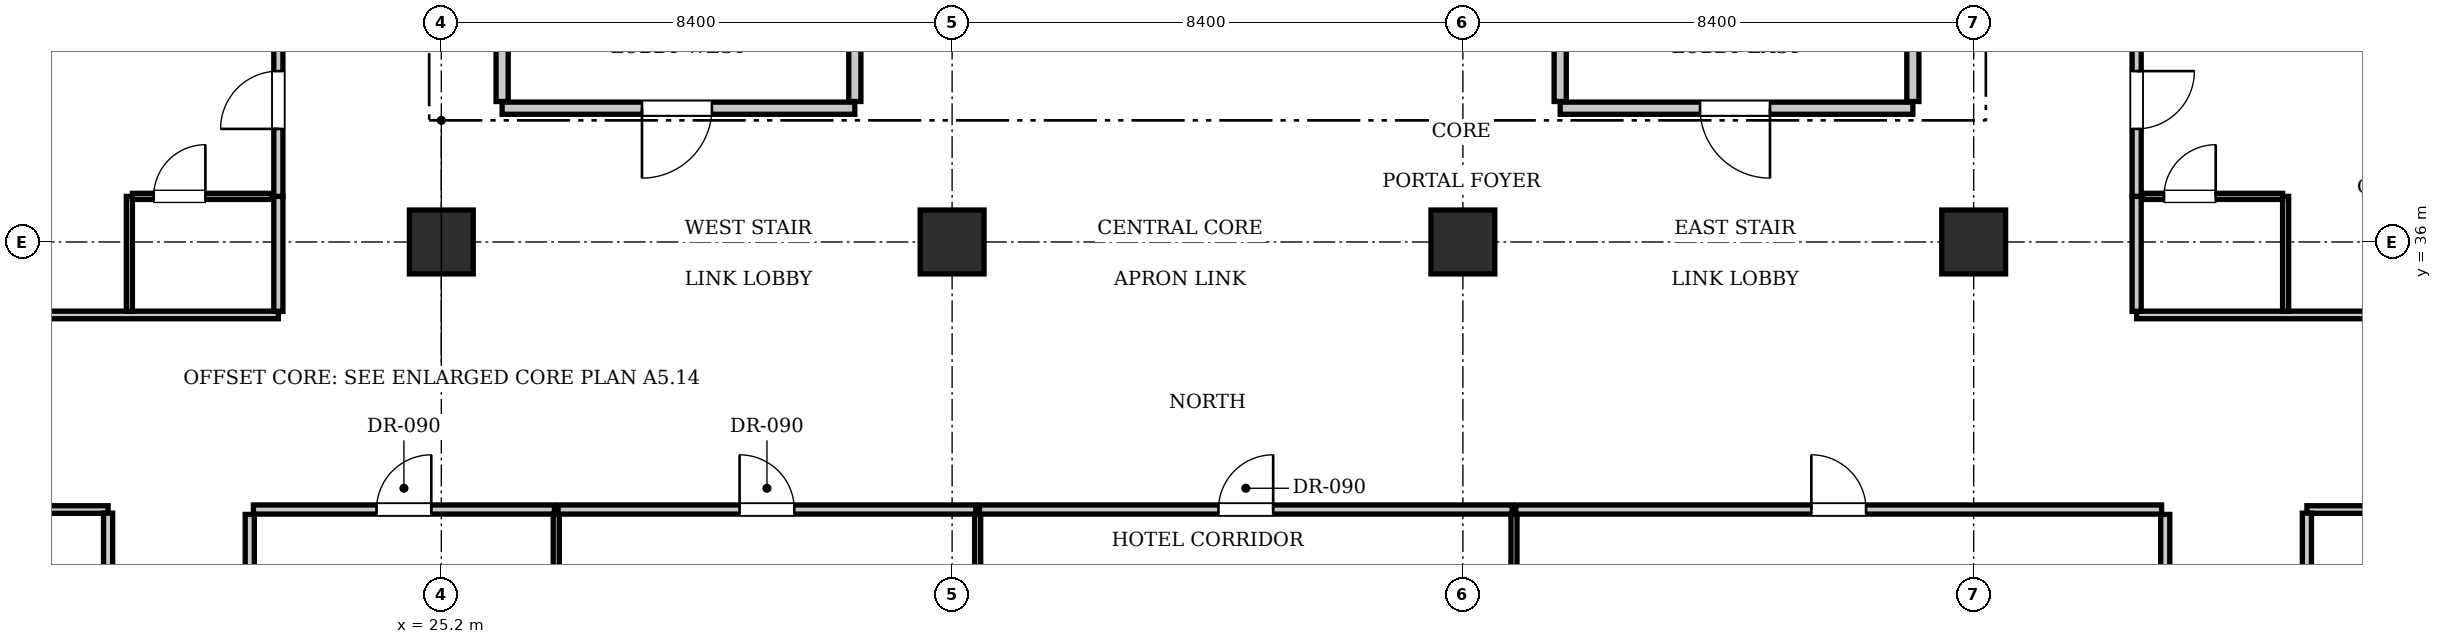
"""IFC4 building model, lengths in metres.
Left out: names, types, materials, properties, quantities, classifications, styles, units other than length and angle.
Written with IfcOpenShell. Run it as: python <this file> out.ifc"""

import sys

from ifc_helpers import new_model, si_unit, direction, frame, frame_2d, origin, origin_2d, place, context, subcontext, project, spatial, rectangle, extrude, element, fill, save


model = new_model("IFC4")
c1 = context("Model", 3, precision=1e-05, world=origin(), true_north=direction((0.0, 1.0)))
c2 = subcontext(c1, "Body", "Model", "MODEL_VIEW")
j1 = project(units=[si_unit("LENGTHUNIT", "METRE"), si_unit("PLANEANGLEUNIT", "RADIAN")], contexts=[c1])
p1 = place(None, origin())
s1 = spatial("IfcSite", under=j1, at=p1, CompositionType="ELEMENT")
p2 = place(p1, origin())
s2 = spatial("IfcBuilding", under=s1, at=p2, CompositionType="ELEMENT")
p3 = place(p2, frame((0.0, 0.0, 80.85)))
s3 = spatial("IfcBuildingStorey", under=s2, at=p3, CompositionType="ELEMENT", Elevation=80.85)
for number, where, z_axis, x_axis in (
    (1, (25.2, 36.0, 0.0), (0.0, 0.0, 1.0), (1.0, 0.0, 0.0)),
    (2, (33.6, 36.0, 0.0), (0.0, 0.0, 1.0), (1.0, 0.0, 0.0)),
    (3, (42.0, 36.0, 0.0), (0.0, 0.0, 1.0), (1.0, 0.0, 0.0)),
    (4, (50.4, 36.0, 0.0), (0.0, 0.0, 1.0), (1.0, 0.0, 0.0)),
):
    element("IfcColumn", number, at=place(p3, frame(where, z_axis=z_axis, x_axis=x_axis)), inside=s3, PredefinedType="COLUMN", context=c2, shape_type="SweptSolid", body=[
        extrude(rectangle(XDim=1.05, YDim=1.05, at=origin_2d()), origin(), (0.0, 0.0, 1.0), 3.85),
    ])
p4 = place(p3, frame((26.2, 38.2, 0.0), z_axis=(0.0, 0.0, 1.0), x_axis=(1.0, 0.0, 0.0)))
e5 = element("IfcWall", 5, at=p4, inside=s3, PredefinedType="PARTITIONING", context=c2, shape_type="SweptSolid", body=[
    extrude(rectangle(XDim=5.8, YDim=0.2, at=frame_2d((2.9, 0.0))), origin(), (0.0, 0.0, 1.0), 3.61),
])
p5 = place(p4, frame((2.3, 0.0, 0.0)))
e6 = element("IfcOpeningElement", 6, at=p5, cuts=e5, PredefinedType="OPENING", context=c2, shape_type="SweptSolid", body=[
    extrude(rectangle(XDim=1.15, YDim=2.15, at=frame_2d((0.575, 1.075))), frame((0.0, 0.11, 0.0), z_axis=(0.0, -1.0, 0.0), x_axis=(1.0, 0.0, 0.0)), (0.0, 0.0, 1.0), 0.22),
])
for number, where, z_axis, x_axis in (
    (7, (26.2, 38.31, 0.0), (0.0, 0.0, 1.0), (0.0, 1.0, 0.0)),
    (8, (32.0, 38.31, 0.0), (0.0, 0.0, 1.0), (0.0, 1.0, 0.0)),
):
    element("IfcWall", number, at=place(p3, frame(where, z_axis=z_axis, x_axis=x_axis)), inside=s3, PredefinedType="PARTITIONING", context=c2, shape_type="SweptSolid", body=[
        extrude(rectangle(XDim=3.07, YDim=0.2, at=frame_2d((1.535, 0.0))), origin(), (0.0, 0.0, 1.0), 3.61),
    ])
p6 = place(p3, frame((43.6, 38.2, 0.0), z_axis=(0.0, 0.0, 1.0), x_axis=(1.0, 0.0, 0.0)))
e9 = element("IfcWall", 9, at=p6, inside=s3, PredefinedType="PARTITIONING", context=c2, shape_type="SweptSolid", body=[
    extrude(rectangle(XDim=5.8, YDim=0.2, at=frame_2d((2.9, 0.0))), origin(), (0.0, 0.0, 1.0), 3.61),
])
p7 = place(p6, frame((2.3, 0.0, 0.0)))
e10 = element("IfcOpeningElement", 10, at=p7, cuts=e9, PredefinedType="OPENING", context=c2, shape_type="SweptSolid", body=[
    extrude(rectangle(XDim=1.15, YDim=2.15, at=frame_2d((0.575, 1.075))), frame((0.0, 0.11, 0.0), z_axis=(0.0, -1.0, 0.0), x_axis=(1.0, 0.0, 0.0)), (0.0, 0.0, 1.0), 0.22),
])
for number, where, z_axis, x_axis in (
    (11, (43.6, 38.31, 0.0), (0.0, 0.0, 1.0), (0.0, 1.0, 0.0)),
    (12, (49.4, 38.31, 0.0), (0.0, 0.0, 1.0), (0.0, 1.0, 0.0)),
):
    element("IfcWall", number, at=place(p3, frame(where, z_axis=z_axis, x_axis=x_axis)), inside=s3, PredefinedType="PARTITIONING", context=c2, shape_type="SweptSolid", body=[
        extrude(rectangle(XDim=3.07, YDim=0.2, at=frame_2d((1.535, 0.0))), origin(), (0.0, 0.0, 1.0), 3.61),
    ])
for number, where, z_axis, x_axis in (
    (13, (22.05, 23.68, 0.0), (0.0, 0.0, 1.0), (0.0, 1.0, 0.0)),
    (14, (53.55, 23.68, 0.0), (0.0, 0.0, 1.0), (0.0, 1.0, 0.0)),
):
    element("IfcWall", number, at=place(p3, frame(where, z_axis=z_axis, x_axis=x_axis)), inside=s3, PredefinedType="PARTITIONING", context=c2, shape_type="SweptSolid", body=[
        extrude(rectangle(XDim=7.84, YDim=0.15, at=frame_2d((3.92, 0.0))), origin(), (0.0, 0.0, 1.0), 3.61),
    ])
p8 = place(p3, frame((22.11, 31.6, 0.0), z_axis=(0.0, 0.0, 1.0), x_axis=(1.0, 0.0, 0.0)))
e15 = element("IfcWall", 15, at=p8, inside=s3, PredefinedType="PARTITIONING", context=c2, shape_type="SweptSolid", body=[
    extrude(rectangle(XDim=4.95, YDim=0.15, at=frame_2d((2.475, 0.0))), origin(), (0.0, 0.0, 1.0), 3.61),
])
p9 = place(p8, frame((2.025, 0.0, 0.0)))
e16 = element("IfcOpeningElement", 16, at=p9, cuts=e15, PredefinedType="OPENING", context=c2, shape_type="SweptSolid", body=[
    extrude(rectangle(XDim=0.9, YDim=2.1, at=frame_2d((0.45, 1.05))), frame((0.0, 0.085, 0.0), z_axis=(0.0, -1.0, 0.0), x_axis=(1.0, 0.0, 0.0)), (0.0, 0.0, 1.0), 0.17),
])
p10 = place(p3, frame((27.09, 23.68, 0.0), z_axis=(0.0, 0.0, 1.0), x_axis=(0.0, 1.0, 0.0)))
e17 = element("IfcWall", 17, at=p10, inside=s3, PredefinedType="PARTITIONING", context=c2, shape_type="SweptSolid", body=[
    extrude(rectangle(XDim=7.84, YDim=0.1, at=frame_2d((3.92, 0.0))), origin(), (0.0, 0.0, 1.0), 3.61),
])
p11 = place(p3, frame((27.12, 31.6, 0.0), z_axis=(0.0, 0.0, 1.0), x_axis=(1.0, 0.0, 0.0)))
e18 = element("IfcWall", 18, at=p11, inside=s3, PredefinedType="PARTITIONING", context=c2, shape_type="SweptSolid", body=[
    extrude(rectangle(XDim=6.87, YDim=0.15, at=frame_2d((3.435, 0.0))), origin(), (0.0, 0.0, 1.0), 3.61),
])
p12 = place(p11, frame((2.985, 0.0, 0.0)))
e19 = element("IfcOpeningElement", 19, at=p12, cuts=e18, PredefinedType="OPENING", context=c2, shape_type="SweptSolid", body=[
    extrude(rectangle(XDim=0.9, YDim=2.1, at=frame_2d((0.45, 1.05))), frame((0.0, 0.085, 0.0), z_axis=(0.0, -1.0, 0.0), x_axis=(1.0, 0.0, 0.0)), (0.0, 0.0, 1.0), 0.17),
])
p13 = place(p3, frame((34.02, 23.68, 0.0), z_axis=(0.0, 0.0, 1.0), x_axis=(0.0, 1.0, 0.0)))
e20 = element("IfcWall", 20, at=p13, inside=s3, PredefinedType="PARTITIONING", context=c2, shape_type="SweptSolid", body=[
    extrude(rectangle(XDim=7.84, YDim=0.1, at=frame_2d((3.92, 0.0))), origin(), (0.0, 0.0, 1.0), 3.61),
])
p14 = place(p3, frame((34.05, 31.6, 0.0), z_axis=(0.0, 0.0, 1.0), x_axis=(1.0, 0.0, 0.0)))
e21 = element("IfcWall", 21, at=p14, inside=s3, PredefinedType="PARTITIONING", context=c2, shape_type="SweptSolid", body=[
    extrude(rectangle(XDim=8.76, YDim=0.15, at=frame_2d((4.38, 0.0))), origin(), (0.0, 0.0, 1.0), 3.61),
])
p15 = place(p14, frame((3.93, 0.0, 0.0)))
e22 = element("IfcOpeningElement", 22, at=p15, cuts=e21, PredefinedType="OPENING", context=c2, shape_type="SweptSolid", body=[
    extrude(rectangle(XDim=0.9, YDim=2.1, at=frame_2d((0.45, 1.05))), frame((0.0, 0.085, 0.0), z_axis=(0.0, -1.0, 0.0), x_axis=(1.0, 0.0, 0.0)), (0.0, 0.0, 1.0), 0.17),
])
p16 = place(p3, frame((42.84, 23.68, 0.0), z_axis=(0.0, 0.0, 1.0), x_axis=(0.0, 1.0, 0.0)))
e23 = element("IfcWall", 23, at=p16, inside=s3, PredefinedType="PARTITIONING", context=c2, shape_type="SweptSolid", body=[
    extrude(rectangle(XDim=7.84, YDim=0.1, at=frame_2d((3.92, 0.0))), origin(), (0.0, 0.0, 1.0), 3.61),
])
p17 = place(p3, frame((42.87, 31.6, 0.0), z_axis=(0.0, 0.0, 1.0), x_axis=(1.0, 0.0, 0.0)))
e24 = element("IfcWall", 24, at=p17, inside=s3, PredefinedType="PARTITIONING", context=c2, shape_type="SweptSolid", body=[
    extrude(rectangle(XDim=10.62, YDim=0.15, at=frame_2d((5.31, 0.0))), origin(), (0.0, 0.0, 1.0), 3.61),
])
p18 = place(p17, frame((4.86, 0.0, 0.0)))
e25 = element("IfcOpeningElement", 25, at=p18, cuts=e24, PredefinedType="OPENING", context=c2, shape_type="SweptSolid", body=[
    extrude(rectangle(XDim=0.9, YDim=2.1, at=frame_2d((0.45, 1.05))), frame((0.0, 0.085, 0.0), z_axis=(0.0, -1.0, 0.0), x_axis=(1.0, 0.0, 0.0)), (0.0, 0.0, 1.0), 0.17),
])
for number, where, z_axis, x_axis in (
    (26, (10.9, 31.6, 0.0), (0.0, 0.0, 1.0), (1.0, 0.0, 0.0)),
    (27, (55.88, 31.6, 0.0), (0.0, 0.0, 1.0), (1.0, 0.0, 0.0)),
):
    element("IfcWall", number, at=place(p3, frame(where, z_axis=z_axis, x_axis=x_axis)), inside=s3, PredefinedType="PARTITIONING", context=c2, shape_type="SweptSolid", body=[
        extrude(rectangle(XDim=8.82, YDim=0.125, at=frame_2d((4.41, 0.0))), origin(), (0.0, 0.0, 1.0), 3.61),
    ])
for number, where, z_axis, x_axis in (
    (28, (19.72, 29.65, 0.0), (0.0, 0.0, 1.0), (0.0, 1.0, 0.0)),
    (29, (55.88, 29.65, 0.0), (0.0, 0.0, 1.0), (0.0, 1.0, 0.0)),
):
    element("IfcWall", number, at=place(p3, frame(where, z_axis=z_axis, x_axis=x_axis)), inside=s3, PredefinedType="PARTITIONING", context=c2, shape_type="SweptSolid", body=[
        extrude(rectangle(XDim=1.89, YDim=0.15, at=frame_2d((0.945, 0.0))), origin(), (0.0, 0.0, 1.0), 3.61),
    ])
p19 = place(p3, frame((10.9, 34.8, 0.0), z_axis=(0.0, 0.0, 1.0), x_axis=(1.0, 0.0, 0.0)))
e30 = element("IfcWall", 30, at=p19, inside=s3, PredefinedType="PARTITIONING", context=c2, shape_type="SweptSolid", body=[
    extrude(rectangle(XDim=11.62, YDim=0.125, at=frame_2d((5.81, 0.0))), origin(), (0.0, 0.0, 1.0), 3.61),
])
p20 = place(p3, frame((53.08, 34.8, 0.0), z_axis=(0.0, 0.0, 1.0), x_axis=(1.0, 0.0, 0.0)))
e31 = element("IfcWall", 31, at=p20, inside=s3, PredefinedType="PARTITIONING", context=c2, shape_type="SweptSolid", body=[
    extrude(rectangle(XDim=11.62, YDim=0.125, at=frame_2d((5.81, 0.0))), origin(), (0.0, 0.0, 1.0), 3.61),
])
p21 = place(p3, frame((22.52, 34.86, 0.0), z_axis=(0.0, 0.0, 1.0), x_axis=(0.0, 1.0, 0.0)))
e32 = element("IfcWall", 32, at=p21, inside=s3, PredefinedType="PARTITIONING", context=c2, shape_type="SweptSolid", body=[
    extrude(rectangle(XDim=1.89, YDim=0.15, at=frame_2d((0.945, 0.0))), origin(), (0.0, 0.0, 1.0), 3.61),
])
p22 = place(p3, frame((22.52, 36.75, 0.0), z_axis=(0.0, 0.0, 1.0), x_axis=(0.0, 1.0, 0.0)))
e33 = element("IfcWall", 33, at=p22, inside=s3, PredefinedType="PARTITIONING", context=c2, shape_type="SweptSolid", body=[
    extrude(rectangle(XDim=3.169, YDim=0.15, at=frame_2d((1.584, 0.0))), origin(), (0.0, 0.0, 1.0), 3.61),
])
p23 = place(p22, frame((1.11, 0.0, 0.0)))
e34 = element("IfcOpeningElement", 34, at=p23, cuts=e33, PredefinedType="OPENING", context=c2, shape_type="SweptSolid", body=[
    extrude(rectangle(XDim=0.95, YDim=2.15, at=frame_2d((0.475, 1.075))), frame((0.0, 0.085, 0.0), z_axis=(0.0, -1.0, 0.0), x_axis=(1.0, 0.0, 0.0)), (0.0, 0.0, 1.0), 0.17),
])
p24 = place(p3, frame((20.07, 34.86, 0.0), z_axis=(0.0, 0.0, 1.0), x_axis=(0.0, 1.0, 0.0)))
e35 = element("IfcWall", 35, at=p24, inside=s3, PredefinedType="PARTITIONING", context=c2, shape_type="SweptSolid", body=[
    extrude(rectangle(XDim=1.89, YDim=0.1, at=frame_2d((0.945, 0.0))), origin(), (0.0, 0.0, 1.0), 3.61),
])
p25 = place(p3, frame((20.12, 36.75, 0.0), z_axis=(0.0, 0.0, 1.0), x_axis=(1.0, 0.0, 0.0)))
e36 = element("IfcWall", 36, at=p25, inside=s3, PredefinedType="PARTITIONING", context=c2, shape_type="SweptSolid", body=[
    extrude(rectangle(XDim=2.3, YDim=0.1, at=frame_2d((1.15, 0.0))), origin(), (0.0, 0.0, 1.0), 3.61),
])
p26 = place(p25, frame((0.35, 0.0, 0.0)))
e37 = element("IfcOpeningElement", 37, at=p26, cuts=e36, PredefinedType="OPENING", context=c2, shape_type="SweptSolid", body=[
    extrude(rectangle(XDim=0.85, YDim=2.1, at=frame_2d((0.425, 1.05))), frame((0.0, 0.06, 0.0), z_axis=(0.0, -1.0, 0.0), x_axis=(1.0, 0.0, 0.0)), (0.0, 0.0, 1.0), 0.12),
])
p27 = place(p3, frame((53.08, 34.86, 0.0), z_axis=(0.0, 0.0, 1.0), x_axis=(0.0, 1.0, 0.0)))
e38 = element("IfcWall", 38, at=p27, inside=s3, PredefinedType="PARTITIONING", context=c2, shape_type="SweptSolid", body=[
    extrude(rectangle(XDim=1.89, YDim=0.15, at=frame_2d((0.945, 0.0))), origin(), (0.0, 0.0, 1.0), 3.61),
])
p28 = place(p3, frame((53.08, 36.75, 0.0), z_axis=(0.0, 0.0, 1.0), x_axis=(0.0, 1.0, 0.0)))
e39 = element("IfcWall", 39, at=p28, inside=s3, PredefinedType="PARTITIONING", context=c2, shape_type="SweptSolid", body=[
    extrude(rectangle(XDim=3.169, YDim=0.15, at=frame_2d((1.584, 0.0))), origin(), (0.0, 0.0, 1.0), 3.61),
])
p29 = place(p28, frame((1.11, 0.0, 0.0)))
e40 = element("IfcOpeningElement", 40, at=p29, cuts=e39, PredefinedType="OPENING", context=c2, shape_type="SweptSolid", body=[
    extrude(rectangle(XDim=0.95, YDim=2.15, at=frame_2d((0.475, 1.075))), frame((0.0, 0.085, 0.0), z_axis=(0.0, -1.0, 0.0), x_axis=(1.0, 0.0, 0.0)), (0.0, 0.0, 1.0), 0.17),
])
p30 = place(p3, frame((55.53, 34.86, 0.0), z_axis=(0.0, 0.0, 1.0), x_axis=(0.0, 1.0, 0.0)))
e41 = element("IfcWall", 41, at=p30, inside=s3, PredefinedType="PARTITIONING", context=c2, shape_type="SweptSolid", body=[
    extrude(rectangle(XDim=1.89, YDim=0.1, at=frame_2d((0.945, 0.0))), origin(), (0.0, 0.0, 1.0), 3.61),
])
p31 = place(p3, frame((53.18, 36.75, 0.0), z_axis=(0.0, 0.0, 1.0), x_axis=(1.0, 0.0, 0.0)))
e42 = element("IfcWall", 42, at=p31, inside=s3, PredefinedType="PARTITIONING", context=c2, shape_type="SweptSolid", body=[
    extrude(rectangle(XDim=2.3, YDim=0.1, at=frame_2d((1.15, 0.0))), origin(), (0.0, 0.0, 1.0), 3.61),
])
p32 = place(p31, frame((0.35, 0.0, 0.0)))
e43 = element("IfcOpeningElement", 43, at=p32, cuts=e42, PredefinedType="OPENING", context=c2, shape_type="SweptSolid", body=[
    extrude(rectangle(XDim=0.85, YDim=2.1, at=frame_2d((0.425, 1.05))), frame((0.0, 0.06, 0.0), z_axis=(0.0, -1.0, 0.0), x_axis=(1.0, 0.0, 0.0)), (0.0, 0.0, 1.0), 0.12),
])
p33 = place(p5, frame((1.15, 0.0, 0.0), z_axis=(0.0, 0.0, 1.0), x_axis=(-1.0, 0.0, 0.0)))
e44 = element("IfcDoor", 44, at=p33, inside=s3, OperationType="SINGLE_SWING_RIGHT", PredefinedType="DOOR", context=c2, shape_type="SweptSolid", body=[
    extrude(rectangle(XDim=1.15, YDim=2.15, at=frame_2d((0.575, 1.075))), frame((0.0, 0.025, 0.0), z_axis=(0.0, -1.0, 0.0), x_axis=(1.0, 0.0, 0.0)), (0.0, 0.0, 1.0), 0.05),
])
fill(e6, e44)
p34 = place(p7, frame((1.15, 0.0, 0.0), z_axis=(0.0, 0.0, 1.0), x_axis=(-1.0, 0.0, 0.0)))
e45 = element("IfcDoor", 45, at=p34, inside=s3, OperationType="SINGLE_SWING_LEFT", PredefinedType="DOOR", context=c2, shape_type="SweptSolid", body=[
    extrude(rectangle(XDim=1.15, YDim=2.15, at=frame_2d((0.575, 1.075))), frame((0.0, 0.025, 0.0), z_axis=(0.0, -1.0, 0.0), x_axis=(1.0, 0.0, 0.0)), (0.0, 0.0, 1.0), 0.05),
])
fill(e10, e45)
p35 = place(p9, origin())
e46 = element("IfcDoor", 46, at=p35, inside=s3, OperationType="SINGLE_SWING_RIGHT", PredefinedType="DOOR", context=c2, shape_type="SweptSolid", body=[
    extrude(rectangle(XDim=0.9, YDim=2.1, at=frame_2d((0.45, 1.05))), frame((0.0, 0.025, 0.0), z_axis=(0.0, -1.0, 0.0), x_axis=(1.0, 0.0, 0.0)), (0.0, 0.0, 1.0), 0.05),
])
fill(e16, e46)
p36 = place(p12, origin())
e47 = element("IfcDoor", 47, at=p36, inside=s3, OperationType="SINGLE_SWING_LEFT", PredefinedType="DOOR", context=c2, shape_type="SweptSolid", body=[
    extrude(rectangle(XDim=0.9, YDim=2.1, at=frame_2d((0.45, 1.05))), frame((0.0, 0.025, 0.0), z_axis=(0.0, -1.0, 0.0), x_axis=(1.0, 0.0, 0.0)), (0.0, 0.0, 1.0), 0.05),
])
fill(e19, e47)
p37 = place(p15, origin())
e48 = element("IfcDoor", 48, at=p37, inside=s3, OperationType="SINGLE_SWING_RIGHT", PredefinedType="DOOR", context=c2, shape_type="SweptSolid", body=[
    extrude(rectangle(XDim=0.9, YDim=2.1, at=frame_2d((0.45, 1.05))), frame((0.0, 0.025, 0.0), z_axis=(0.0, -1.0, 0.0), x_axis=(1.0, 0.0, 0.0)), (0.0, 0.0, 1.0), 0.05),
])
fill(e22, e48)
p38 = place(p18, origin())
e49 = element("IfcDoor", 49, at=p38, inside=s3, OperationType="SINGLE_SWING_LEFT", PredefinedType="DOOR", context=c2, shape_type="SweptSolid", body=[
    extrude(rectangle(XDim=0.9, YDim=2.1, at=frame_2d((0.45, 1.05))), frame((0.0, 0.025, 0.0), z_axis=(0.0, -1.0, 0.0), x_axis=(1.0, 0.0, 0.0)), (0.0, 0.0, 1.0), 0.05),
])
fill(e25, e49)
p39 = place(p26, origin())
e50 = element("IfcDoor", 50, at=p39, inside=s3, OperationType="SINGLE_SWING_RIGHT", PredefinedType="DOOR", context=c2, shape_type="SweptSolid", body=[
    extrude(rectangle(XDim=0.85, YDim=2.1, at=frame_2d((0.425, 1.05))), frame((0.0, 0.025, 0.0), z_axis=(0.0, -1.0, 0.0), x_axis=(1.0, 0.0, 0.0)), (0.0, 0.0, 1.0), 0.05),
])
fill(e37, e50)
p40 = place(p23, origin())
e51 = element("IfcDoor", 51, at=p40, inside=s3, OperationType="SINGLE_SWING_LEFT", PredefinedType="DOOR", context=c2, shape_type="SweptSolid", body=[
    extrude(rectangle(XDim=0.95, YDim=2.15, at=frame_2d((0.475, 1.075))), frame((0.0, 0.025, 0.0), z_axis=(0.0, -1.0, 0.0), x_axis=(1.0, 0.0, 0.0)), (0.0, 0.0, 1.0), 0.05),
])
fill(e34, e51)
p41 = place(p32, origin())
e52 = element("IfcDoor", 52, at=p41, inside=s3, OperationType="SINGLE_SWING_RIGHT", PredefinedType="DOOR", context=c2, shape_type="SweptSolid", body=[
    extrude(rectangle(XDim=0.85, YDim=2.1, at=frame_2d((0.425, 1.05))), frame((0.0, 0.025, 0.0), z_axis=(0.0, -1.0, 0.0), x_axis=(1.0, 0.0, 0.0)), (0.0, 0.0, 1.0), 0.05),
])
fill(e43, e52)
p42 = place(p29, frame((0.95, 0.0, 0.0), z_axis=(0.0, 0.0, 1.0), x_axis=(-1.0, 0.0, 0.0)))
e53 = element("IfcDoor", 53, at=p42, inside=s3, OperationType="SINGLE_SWING_LEFT", PredefinedType="DOOR", context=c2, shape_type="SweptSolid", body=[
    extrude(rectangle(XDim=0.95, YDim=2.15, at=frame_2d((0.475, 1.075))), frame((0.0, 0.025, 0.0), z_axis=(0.0, -1.0, 0.0), x_axis=(1.0, 0.0, 0.0)), (0.0, 0.0, 1.0), 0.05),
])
fill(e40, e53)
save(model, sys.argv[1])
